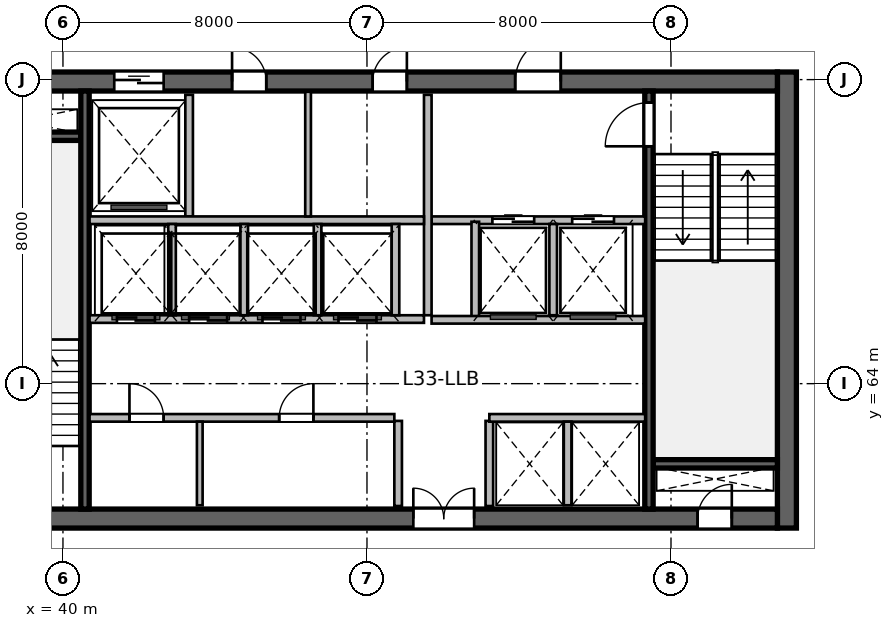
"""IFC4 building model, lengths in metres.
Left out: names, types, materials, properties, quantities, classifications, styles, units other than length and angle.
Written with IfcOpenShell. Run it as: python <this file> out.ifc"""

import sys

from ifc_helpers import new_model, si_unit, direction, frame, frame_2d, origin, place, context, subcontext, project, spatial, rectangle, extrude, source, transform, mapped, element, fill, save


model = new_model("IFC4")
c1 = context("Model", 3, precision=1e-05, world=origin(), true_north=direction((0.0, 1.0)))
c2 = subcontext(c1, "Body", "Model", "MODEL_VIEW")
j1 = project(units=[si_unit("LENGTHUNIT", "METRE"), si_unit("PLANEANGLEUNIT", "RADIAN")], contexts=[c1])
p1 = place(None, origin())
s1 = spatial("IfcSite", under=j1, at=p1, CompositionType="ELEMENT")
p2 = place(p1, origin())
s2 = spatial("IfcBuilding", under=s1, at=p2, CompositionType="ELEMENT")
p3 = place(p2, frame((0.0, 0.0, 138.9)))
s3 = spatial("IfcBuildingStorey", under=s2, at=p3, CompositionType="ELEMENT", Elevation=138.9)
m1 = source(origin(), c2, "Body", "SweptSolid", [
    extrude(rectangle(XDim=12.0, YDim=0.5, at=frame_2d((6.0, 0.0))), origin(), (0.0, 0.0, 1.0), 3.9),
])
p4 = place(p3, frame((59.05, 60.2, 0.0), z_axis=(0.0, 0.0, 1.0), x_axis=(0.0, 1.0, 0.0)))
e1 = element("IfcWall", 1, at=p4, inside=s3, PredefinedType="SHEAR", context=c2, shape_type="MappedRepresentation", body=[
    mapped(m1, transform((0.0, 0.0, 0.0), scale=1.0)),
])
m2 = source(origin(), c2, "Body", "SweptSolid", [
    extrude(rectangle(XDim=21.6, YDim=0.5, at=frame_2d((10.8, 0.0))), origin(), (0.0, 0.0, 1.0), 3.9),
])
p5 = place(p3, frame((37.2, 60.45, 0.0), z_axis=(0.0, 0.0, 1.0), x_axis=(1.0, 0.0, 0.0)))
e2 = element("IfcWall", 2, at=p5, inside=s3, PredefinedType="SHEAR", context=c2, shape_type="MappedRepresentation", body=[
    mapped(m2, transform((0.0, 0.0, 0.0), scale=1.0)),
])
p6 = place(p5, frame((1.1, 0.0, 0.0)))
e3 = element("IfcOpeningElement", 3, at=p6, cuts=e2, PredefinedType="OPENING", context=c2, shape_type="SweptSolid", body=[
    extrude(rectangle(XDim=1.15, YDim=2.15, at=frame_2d((0.575, 1.075))), frame((0.0, 0.26, 0.0), z_axis=(0.0, -1.0, 0.0), x_axis=(1.0, 0.0, 0.0)), (0.0, 0.0, 1.0), 0.52),
])
p7 = place(p5, frame((19.5, 0.0, 0.0)))
e4 = element("IfcOpeningElement", 4, at=p7, cuts=e2, PredefinedType="OPENING", context=c2, shape_type="SweptSolid", body=[
    extrude(rectangle(XDim=0.9, YDim=2.1, at=frame_2d((0.45, 1.05))), frame((0.0, 0.26, 0.0), z_axis=(0.0, -1.0, 0.0), x_axis=(1.0, 0.0, 0.0)), (0.0, 0.0, 1.0), 0.52),
])
p8 = place(p5, frame((12.02, 0.0, 0.0)))
e5 = element("IfcOpeningElement", 5, at=p8, cuts=e2, PredefinedType="OPENING", context=c2, shape_type="SweptSolid", body=[
    extrude(rectangle(XDim=1.6, YDim=2.15, at=frame_2d((0.8, 1.075))), frame((0.0, 0.26, 0.0), z_axis=(0.0, -1.0, 0.0), x_axis=(1.0, 0.0, 0.0)), (0.0, 0.0, 1.0), 0.52),
])
p9 = place(p3, frame((37.2, 71.95, 0.0), z_axis=(0.0, 0.0, 1.0), x_axis=(1.0, 0.0, 0.0)))
e6 = element("IfcWall", 6, at=p9, inside=s3, PredefinedType="SHEAR", context=c2, shape_type="MappedRepresentation", body=[
    mapped(m2, transform((0.0, 0.0, 0.0), scale=1.0)),
])
p10 = place(p9, frame((1.2, 0.0, 0.0)))
e7 = element("IfcOpeningElement", 7, at=p10, cuts=e6, PredefinedType="OPENING", context=c2, shape_type="SweptSolid", body=[
    extrude(rectangle(XDim=0.9, YDim=2.1, at=frame_2d((0.45, 1.05))), frame((0.0, 0.26, 0.0), z_axis=(0.0, -1.0, 0.0), x_axis=(1.0, 0.0, 0.0)), (0.0, 0.0, 1.0), 0.52),
])
p11 = place(p9, frame((14.7, 0.0, 0.0)))
e8 = element("IfcOpeningElement", 8, at=p11, cuts=e6, PredefinedType="OPENING", context=c2, shape_type="SweptSolid", body=[
    extrude(rectangle(XDim=1.2, YDim=2.15, at=frame_2d((0.6, 1.075))), frame((0.0, 0.26, 0.0), z_axis=(0.0, -1.0, 0.0), x_axis=(1.0, 0.0, 0.0)), (0.0, 0.0, 1.0), 0.52),
])
p12 = place(p9, frame((4.15, 0.0, 0.0)))
e9 = element("IfcOpeningElement", 9, at=p12, cuts=e6, PredefinedType="OPENING", context=c2, shape_type="SweptSolid", body=[
    extrude(rectangle(XDim=1.3, YDim=2.15, at=frame_2d((0.65, 1.075))), frame((0.0, 0.26, 0.0), z_axis=(0.0, -1.0, 0.0), x_axis=(1.0, 0.0, 0.0)), (0.0, 0.0, 1.0), 0.52),
])
p13 = place(p9, frame((7.25, 0.0, 0.0)))
e10 = element("IfcOpeningElement", 10, at=p13, cuts=e6, PredefinedType="OPENING", context=c2, shape_type="SweptSolid", body=[
    extrude(rectangle(XDim=0.9, YDim=2.1, at=frame_2d((0.45, 1.05))), frame((0.0, 0.26, 0.0), z_axis=(0.0, -1.0, 0.0), x_axis=(1.0, 0.0, 0.0)), (0.0, 0.0, 1.0), 0.52),
])
p14 = place(p9, frame((10.95, 0.0, 0.0)))
e11 = element("IfcOpeningElement", 11, at=p14, cuts=e6, PredefinedType="OPENING", context=c2, shape_type="SweptSolid", body=[
    extrude(rectangle(XDim=0.9, YDim=2.1, at=frame_2d((0.45, 1.05))), frame((0.0, 0.26, 0.0), z_axis=(0.0, -1.0, 0.0), x_axis=(1.0, 0.0, 0.0)), (0.0, 0.0, 1.0), 0.52),
])
m3 = source(origin(), c2, "Body", "SweptSolid", [
    extrude(rectangle(XDim=3.27, YDim=0.22, at=frame_2d((1.635, 0.0))), origin(), (0.0, 0.0, 1.0), 3.9),
])
for number, where, z_axis, x_axis in (
    (12, (37.2, 70.51, 0.0), (0.0, 0.0, 1.0), (1.0, 0.0, 0.0)),
    (13, (55.53, 61.89, 0.0), (0.0, 0.0, 1.0), (1.0, 0.0, 0.0)),
):
    element("IfcWall", number, at=place(p3, frame(where, z_axis=z_axis, x_axis=x_axis)), inside=s3, PredefinedType="SHEAR", context=c2, shape_type="MappedRepresentation", body=[
        mapped(m3, transform((0.0, 0.0, 0.0), scale=1.0)),
    ])
m4 = source(origin(), c2, "Body", "SweptSolid", [
    extrude(rectangle(XDim=11.0, YDim=0.22, at=frame_2d((5.5, 0.0))), origin(), (0.0, 0.0, 1.0), 3.9),
])
p15 = place(p3, frame((40.58, 60.7, 0.0), z_axis=(0.0, 0.0, 1.0), x_axis=(0.0, 1.0, 0.0)))
e14 = element("IfcWall", 14, at=p15, inside=s3, PredefinedType="SHEAR", context=c2, shape_type="MappedRepresentation", body=[
    mapped(m4, transform((0.0, 0.0, 0.0), scale=1.0)),
])
p16 = place(p3, frame((55.42, 60.7, 0.0), z_axis=(0.0, 0.0, 1.0), x_axis=(0.0, 1.0, 0.0)))
e15 = element("IfcWall", 15, at=p16, inside=s3, PredefinedType="SHEAR", context=c2, shape_type="MappedRepresentation", body=[
    mapped(m4, transform((0.0, 0.0, 0.0), scale=1.0)),
])
p17 = place(p16, frame((9.545, 0.0, 0.0)))
e16 = element("IfcOpeningElement", 16, at=p17, cuts=e15, PredefinedType="OPENING", context=c2, shape_type="SweptSolid", body=[
    extrude(rectangle(XDim=1.15, YDim=2.15, at=frame_2d((0.575, 1.075))), frame((0.0, 0.12, 0.0), z_axis=(0.0, -1.0, 0.0), x_axis=(1.0, 0.0, 0.0)), (0.0, 0.0, 1.0), 0.24),
])
m5 = source(origin(), c2, "Body", "SweptSolid", [
    extrude(rectangle(XDim=2.24, YDim=0.2, at=frame_2d((1.12, 0.0))), origin(), (0.0, 0.0, 1.0), 3.65),
])
for number, where, z_axis, x_axis in (
    (17, (48.82, 60.78, 0.0), (0.0, 0.0, 1.0), (0.0, 1.0, 0.0)),
    (18, (51.22, 60.78, 0.0), (0.0, 0.0, 1.0), (0.0, 1.0, 0.0)),
):
    element("IfcWall", number, at=place(p3, frame(where, z_axis=z_axis, x_axis=x_axis)), inside=s3, PredefinedType="SOLIDWALL", context=c2, shape_type="MappedRepresentation", body=[
        mapped(m5, transform((0.0, 0.0, 0.0), scale=1.0)),
    ])
m6 = source(origin(), c2, "Body", "SweptSolid", [
    extrude(rectangle(XDim=5.62, YDim=0.2, at=frame_2d((2.81, 0.0))), origin(), (0.0, 0.0, 1.0), 3.65),
])
p18 = place(p3, frame((49.7, 68.3, 0.0), z_axis=(0.0, 0.0, 1.0), x_axis=(1.0, 0.0, 0.0)))
e19 = element("IfcWall", 19, at=p18, inside=s3, PredefinedType="SOLIDWALL", context=c2, shape_type="MappedRepresentation", body=[
    mapped(m6, transform((0.0, 0.0, 0.0), scale=1.0)),
])
p19 = place(p18, frame((1.6, 0.0, 0.0)))
e20 = element("IfcOpeningElement", 20, at=p19, cuts=e19, PredefinedType="OPENING", context=c2, shape_type="SweptSolid", body=[
    extrude(rectangle(XDim=1.1, YDim=2.15, at=frame_2d((0.55, 1.075))), frame((0.0, 0.11, 0.0), z_axis=(0.0, -1.0, 0.0), x_axis=(1.0, 0.0, 0.0)), (0.0, 0.0, 1.0), 0.22),
])
p20 = place(p18, frame((3.7, 0.0, 0.0)))
e21 = element("IfcOpeningElement", 21, at=p20, cuts=e19, PredefinedType="OPENING", context=c2, shape_type="SweptSolid", body=[
    extrude(rectangle(XDim=1.1, YDim=2.15, at=frame_2d((0.55, 1.075))), frame((0.0, 0.11, 0.0), z_axis=(0.0, -1.0, 0.0), x_axis=(1.0, 0.0, 0.0)), (0.0, 0.0, 1.0), 0.22),
])
m7 = source(origin(), c2, "Body", "SweptSolid", [
    extrude(rectangle(XDim=5.8, YDim=0.2, at=frame_2d((2.9, 0.0))), origin(), (0.0, 0.0, 1.0), 3.65),
])
p21 = place(p3, frame((49.6, 65.8, 0.0), z_axis=(0.0, 0.0, 1.0), x_axis=(0.0, 1.0, 0.0)))
e22 = element("IfcWall", 22, at=p21, inside=s3, PredefinedType="SOLIDWALL", context=c2, shape_type="MappedRepresentation", body=[
    mapped(m7, transform((0.0, 0.0, 0.0), scale=1.0)),
])
m8 = source(origin(), c2, "Body", "SweptSolid", [
    extrude(rectangle(XDim=2.58, YDim=0.2, at=frame_2d((1.29, 0.0))), origin(), (0.0, 0.0, 1.0), 3.65),
])
p22 = place(p3, frame((50.85, 65.68, 0.0), z_axis=(0.0, 0.0, 1.0), x_axis=(0.0, 1.0, 0.0)))
e23 = element("IfcWall", 23, at=p22, inside=s3, PredefinedType="SOLIDWALL", context=c2, shape_type="MappedRepresentation", body=[
    mapped(m8, transform((0.0, 0.0, 0.0), scale=1.0)),
])
m9 = source(origin(), c2, "Body", "SweptSolid", [
    extrude(rectangle(XDim=2.4, YDim=0.2, at=frame_2d((1.2, 0.0))), origin(), (0.0, 0.0, 1.0), 3.65),
])
p23 = place(p3, frame((52.9, 65.8, 0.0), z_axis=(0.0, 0.0, 1.0), x_axis=(0.0, 1.0, 0.0)))
e24 = element("IfcWall", 24, at=p23, inside=s3, PredefinedType="SOLIDWALL", context=c2, shape_type="MappedRepresentation", body=[
    mapped(m9, transform((0.0, 0.0, 0.0), scale=1.0)),
])
p24 = place(p3, frame((49.7, 65.68, 0.0), z_axis=(0.0, 0.0, 1.0), x_axis=(1.0, 0.0, 0.0)))
e25 = element("IfcWall", 25, at=p24, inside=s3, PredefinedType="SOLIDWALL", context=c2, shape_type="MappedRepresentation", body=[
    mapped(m6, transform((0.0, 0.0, 0.0), scale=1.0)),
])
m10 = source(origin(), c2, "Body", "SweptSolid", [
    extrude(rectangle(XDim=3.2, YDim=0.2, at=frame_2d((1.6, 0.0))), origin(), (0.0, 0.0, 1.0), 3.65),
])
p25 = place(p3, frame((43.32, 68.4, 0.0), z_axis=(0.0, 0.0, 1.0), x_axis=(0.0, 1.0, 0.0)))
e26 = element("IfcWall", 26, at=p25, inside=s3, PredefinedType="SOLIDWALL", context=c2, shape_type="MappedRepresentation", body=[
    mapped(m10, transform((0.0, 0.0, 0.0), scale=1.0)),
])
m11 = source(origin(), c2, "Body", "SweptSolid", [
    extrude(rectangle(XDim=8.8, YDim=0.2, at=frame_2d((4.4, 0.0))), origin(), (0.0, 0.0, 1.0), 3.65),
])
p26 = place(p3, frame((40.7, 68.3, 0.0), z_axis=(0.0, 0.0, 1.0), x_axis=(1.0, 0.0, 0.0)))
e27 = element("IfcWall", 27, at=p26, inside=s3, PredefinedType="SOLIDWALL", context=c2, shape_type="MappedRepresentation", body=[
    mapped(m11, transform((0.0, 0.0, 0.0), scale=1.0)),
])
m12 = source(origin(), c2, "Body", "SweptSolid", [
    extrude(rectangle(XDim=3.28, YDim=0.15, at=frame_2d((1.64, 0.0))), origin(), (0.0, 0.0, 1.0), 3.65),
])
p27 = place(p3, frame((46.45, 68.4, 0.0), z_axis=(0.0, 0.0, 1.0), x_axis=(0.0, 1.0, 0.0)))
e28 = element("IfcWall", 28, at=p27, inside=s3, PredefinedType="PARTITIONING", context=c2, shape_type="MappedRepresentation", body=[
    mapped(m12, transform((0.0, 0.0, 0.0), scale=1.0)),
])
m13 = source(origin(), c2, "Body", "SweptSolid", [
    extrude(rectangle(XDim=8.02, YDim=0.2, at=frame_2d((4.01, 0.0))), origin(), (0.0, 0.0, 1.0), 3.65),
])
p28 = place(p3, frame((40.7, 63.1, 0.0), z_axis=(0.0, 0.0, 1.0), x_axis=(1.0, 0.0, 0.0)))
e29 = element("IfcWall", 29, at=p28, inside=s3, PredefinedType="SOLIDWALL", context=c2, shape_type="MappedRepresentation", body=[
    mapped(m13, transform((0.0, 0.0, 0.0), scale=1.0)),
])
p29 = place(p28, frame((1.05, 0.0, 0.0)))
e30 = element("IfcOpeningElement", 30, at=p29, cuts=e29, PredefinedType="OPENING", context=c2, shape_type="SweptSolid", body=[
    extrude(rectangle(XDim=0.9, YDim=2.1, at=frame_2d((0.45, 1.05))), frame((0.0, 0.11, 0.0), z_axis=(0.0, -1.0, 0.0), x_axis=(1.0, 0.0, 0.0)), (0.0, 0.0, 1.0), 0.22),
])
p30 = place(p28, frame((4.99, 0.0, 0.0)))
e31 = element("IfcOpeningElement", 31, at=p30, cuts=e29, PredefinedType="OPENING", context=c2, shape_type="SweptSolid", body=[
    extrude(rectangle(XDim=0.9, YDim=2.1, at=frame_2d((0.45, 1.05))), frame((0.0, 0.11, 0.0), z_axis=(0.0, -1.0, 0.0), x_axis=(1.0, 0.0, 0.0)), (0.0, 0.0, 1.0), 0.22),
])
m14 = source(origin(), c2, "Body", "SweptSolid", [
    extrude(rectangle(XDim=4.1, YDim=0.2, at=frame_2d((2.05, 0.0))), origin(), (0.0, 0.0, 1.0), 3.65),
])
p31 = place(p3, frame((51.22, 63.1, 0.0), z_axis=(0.0, 0.0, 1.0), x_axis=(1.0, 0.0, 0.0)))
e32 = element("IfcWall", 32, at=p31, inside=s3, PredefinedType="SOLIDWALL", context=c2, shape_type="MappedRepresentation", body=[
    mapped(m14, transform((0.0, 0.0, 0.0), scale=1.0)),
])
m15 = source(origin(), c2, "Body", "SweptSolid", [
    extrude(rectangle(XDim=2.2, YDim=0.15, at=frame_2d((1.1, 0.0))), origin(), (0.0, 0.0, 1.0), 3.65),
])
p32 = place(p3, frame((43.6, 60.8, 0.0), z_axis=(0.0, 0.0, 1.0), x_axis=(0.0, 1.0, 0.0)))
e33 = element("IfcWall", 33, at=p32, inside=s3, PredefinedType="PARTITIONING", context=c2, shape_type="MappedRepresentation", body=[
    mapped(m15, transform((0.0, 0.0, 0.0), scale=1.0)),
])
m16 = source(origin(), c2, "Body", "SweptSolid", [
    extrude(rectangle(XDim=2.2, YDim=0.2, at=frame_2d((1.1, 0.0))), origin(), (0.0, 0.0, 1.0), 3.65),
])
p33 = place(p3, frame((53.28, 60.8, 0.0), z_axis=(0.0, 0.0, 1.0), x_axis=(0.0, 1.0, 0.0)))
e34 = element("IfcWall", 34, at=p33, inside=s3, PredefinedType="SOLIDWALL", context=c2, shape_type="MappedRepresentation", body=[
    mapped(m16, transform((0.0, 0.0, 0.0), scale=1.0)),
])
p34 = place(p3, frame((40.7, 65.7, 0.0), z_axis=(0.0, 0.0, 1.0), x_axis=(1.0, 0.0, 0.0)))
e35 = element("IfcWall", 35, at=p34, inside=s3, PredefinedType="SOLIDWALL", context=c2, shape_type="MappedRepresentation", body=[
    mapped(m11, transform((0.0, 0.0, 0.0), scale=1.0)),
])
p35 = place(p34, frame((0.72, 0.0, 0.0)))
e36 = element("IfcOpeningElement", 36, at=p35, cuts=e35, PredefinedType="OPENING", context=c2, shape_type="SweptSolid", body=[
    extrude(rectangle(XDim=1.0, YDim=2.15, at=frame_2d((0.5, 1.075))), frame((0.0, 0.11, 0.0), z_axis=(0.0, -1.0, 0.0), x_axis=(1.0, 0.0, 0.0)), (0.0, 0.0, 1.0), 0.22),
])
p36 = place(p34, frame((2.62, 0.0, 0.0)))
e37 = element("IfcOpeningElement", 37, at=p36, cuts=e35, PredefinedType="OPENING", context=c2, shape_type="SweptSolid", body=[
    extrude(rectangle(XDim=1.0, YDim=2.15, at=frame_2d((0.5, 1.075))), frame((0.0, 0.11, 0.0), z_axis=(0.0, -1.0, 0.0), x_axis=(1.0, 0.0, 0.0)), (0.0, 0.0, 1.0), 0.22),
])
p37 = place(p34, frame((4.55, 0.0, 0.0)))
e38 = element("IfcOpeningElement", 38, at=p37, cuts=e35, PredefinedType="OPENING", context=c2, shape_type="SweptSolid", body=[
    extrude(rectangle(XDim=1.0, YDim=2.15, at=frame_2d((0.5, 1.075))), frame((0.0, 0.11, 0.0), z_axis=(0.0, -1.0, 0.0), x_axis=(1.0, 0.0, 0.0)), (0.0, 0.0, 1.0), 0.22),
])
p38 = place(p34, frame((6.55, 0.0, 0.0)))
e39 = element("IfcOpeningElement", 39, at=p38, cuts=e35, PredefinedType="OPENING", context=c2, shape_type="SweptSolid", body=[
    extrude(rectangle(XDim=1.0, YDim=2.15, at=frame_2d((0.5, 1.075))), frame((0.0, 0.11, 0.0), z_axis=(0.0, -1.0, 0.0), x_axis=(1.0, 0.0, 0.0)), (0.0, 0.0, 1.0), 0.22),
])
for number, where, z_axis, x_axis in (
    (40, (48.75, 65.8, 0.0), (0.0, 0.0, 1.0), (0.0, 1.0, 0.0)),
    (41, (42.87, 65.8, 0.0), (0.0, 0.0, 1.0), (0.0, 1.0, 0.0)),
    (42, (44.77, 65.8, 0.0), (0.0, 0.0, 1.0), (0.0, 1.0, 0.0)),
    (43, (46.7, 65.8, 0.0), (0.0, 0.0, 1.0), (0.0, 1.0, 0.0)),
):
    element("IfcWall", number, at=place(p3, frame(where, z_axis=z_axis, x_axis=x_axis)), inside=s3, PredefinedType="SOLIDWALL", context=c2, shape_type="MappedRepresentation", body=[
        mapped(m9, transform((0.0, 0.0, 0.0), scale=1.0)),
    ])
m17 = source(origin(), c2, "Body", "SweptSolid", [
    extrude(rectangle(XDim=0.9, YDim=2.1, at=frame_2d((0.45, 1.05))), frame((0.0, 0.025, 0.0), z_axis=(0.0, -1.0, 0.0), x_axis=(1.0, 0.0, 0.0)), (0.0, 0.0, 1.0), 0.05),
])
p39 = place(p7, origin())
e44 = element("IfcDoor", 44, at=p39, inside=s3, OperationType="SINGLE_SWING_RIGHT", PredefinedType="DOOR", context=c2, shape_type="MappedRepresentation", body=[
    mapped(m17, transform((0.0, 0.0, 0.0), scale=1.0)),
])
fill(e4, e44)
m18 = source(origin(), c2, "Body", "SweptSolid", [
    extrude(rectangle(XDim=1.15, YDim=2.15, at=frame_2d((0.575, 1.075))), frame((0.0, 0.025, 0.0), z_axis=(0.0, -1.0, 0.0), x_axis=(1.0, 0.0, 0.0)), (0.0, 0.0, 1.0), 0.05),
])
p40 = place(p17, origin())
e45 = element("IfcDoor", 45, at=p40, inside=s3, OperationType="SINGLE_SWING_LEFT", PredefinedType="DOOR", context=c2, shape_type="MappedRepresentation", body=[
    mapped(m18, transform((0.0, 0.0, 0.0), scale=1.0)),
])
fill(e16, e45)
m19 = source(origin(), c2, "Body", "SweptSolid", [
    extrude(rectangle(XDim=1.6, YDim=2.15, at=frame_2d((0.8, 1.075))), frame((0.0, 0.025, 0.0), z_axis=(0.0, -1.0, 0.0), x_axis=(1.0, 0.0, 0.0)), (0.0, 0.0, 1.0), 0.05),
])
p41 = place(p8, origin())
e46 = element("IfcDoor", 46, at=p41, inside=s3, OperationType="DOUBLE_DOOR_SINGLE_SWING", PredefinedType="DOOR", context=c2, shape_type="MappedRepresentation", body=[
    mapped(m19, transform((0.0, 0.0, 0.0), scale=1.0)),
])
fill(e5, e46)
m20 = source(origin(), c2, "Body", "SweptSolid", [
    extrude(rectangle(XDim=1.2, YDim=2.15, at=frame_2d((0.6, 1.075))), frame((0.0, 0.025, 0.0), z_axis=(0.0, -1.0, 0.0), x_axis=(1.0, 0.0, 0.0)), (0.0, 0.0, 1.0), 0.05),
])
p42 = place(p11, origin())
e47 = element("IfcDoor", 47, at=p42, inside=s3, OperationType="SINGLE_SWING_RIGHT", PredefinedType="DOOR", context=c2, shape_type="MappedRepresentation", body=[
    mapped(m20, transform((0.0, 0.0, 0.0), scale=1.0)),
])
fill(e8, e47)
m21 = source(origin(), c2, "Body", "SweptSolid", [
    extrude(rectangle(XDim=1.1, YDim=2.15, at=frame_2d((0.55, 1.075))), frame((0.0, 0.025, 0.0), z_axis=(0.0, -1.0, 0.0), x_axis=(1.0, 0.0, 0.0)), (0.0, 0.0, 1.0), 0.05),
])
p43 = place(p19, origin())
e48 = element("IfcDoor", 48, at=p43, inside=s3, OperationType="DOUBLE_DOOR_SLIDING", PredefinedType="DOOR", context=c2, shape_type="MappedRepresentation", body=[
    mapped(m21, transform((0.0, 0.0, 0.0), scale=1.0)),
])
fill(e20, e48)
p44 = place(p20, origin())
e49 = element("IfcDoor", 49, at=p44, inside=s3, OperationType="DOUBLE_DOOR_SLIDING", PredefinedType="DOOR", context=c2, shape_type="MappedRepresentation", body=[
    mapped(m21, transform((0.0, 0.0, 0.0), scale=1.0)),
])
fill(e21, e49)
m22 = source(origin(), c2, "Body", "SweptSolid", [
    extrude(rectangle(XDim=1.3, YDim=2.15, at=frame_2d((0.65, 1.075))), frame((0.0, 0.025, 0.0), z_axis=(0.0, -1.0, 0.0), x_axis=(1.0, 0.0, 0.0)), (0.0, 0.0, 1.0), 0.05),
])
p45 = place(p12, origin())
e50 = element("IfcDoor", 50, at=p45, inside=s3, OperationType="DOUBLE_DOOR_SLIDING", PredefinedType="DOOR", context=c2, shape_type="MappedRepresentation", body=[
    mapped(m22, transform((0.0, 0.0, 0.0), scale=1.0)),
])
fill(e9, e50)
p46 = place(p13, origin())
e51 = element("IfcDoor", 51, at=p46, inside=s3, OperationType="SINGLE_SWING_LEFT", PredefinedType="DOOR", context=c2, shape_type="MappedRepresentation", body=[
    mapped(m17, transform((0.0, 0.0, 0.0), scale=1.0)),
])
fill(e10, e51)
p47 = place(p14, origin())
e52 = element("IfcDoor", 52, at=p47, inside=s3, OperationType="SINGLE_SWING_RIGHT", PredefinedType="DOOR", context=c2, shape_type="MappedRepresentation", body=[
    mapped(m17, transform((0.0, 0.0, 0.0), scale=1.0)),
])
fill(e11, e52)
p48 = place(p29, origin())
e53 = element("IfcDoor", 53, at=p48, inside=s3, OperationType="SINGLE_SWING_LEFT", PredefinedType="DOOR", context=c2, shape_type="MappedRepresentation", body=[
    mapped(m17, transform((0.0, 0.0, 0.0), scale=1.0)),
])
fill(e30, e53)
p49 = place(p30, origin())
e54 = element("IfcDoor", 54, at=p49, inside=s3, OperationType="SINGLE_SWING_RIGHT", PredefinedType="DOOR", context=c2, shape_type="MappedRepresentation", body=[
    mapped(m17, transform((0.0, 0.0, 0.0), scale=1.0)),
])
fill(e31, e54)
m23 = source(origin(), c2, "Body", "SweptSolid", [
    extrude(rectangle(XDim=1.0, YDim=2.15, at=frame_2d((0.5, 1.075))), frame((0.0, 0.025, 0.0), z_axis=(0.0, -1.0, 0.0), x_axis=(1.0, 0.0, 0.0)), (0.0, 0.0, 1.0), 0.05),
])
p50 = place(p35, origin())
e55 = element("IfcDoor", 55, at=p50, inside=s3, OperationType="DOUBLE_DOOR_SLIDING", PredefinedType="DOOR", context=c2, shape_type="MappedRepresentation", body=[
    mapped(m23, transform((0.0, 0.0, 0.0), scale=1.0)),
])
fill(e36, e55)
p51 = place(p36, origin())
e56 = element("IfcDoor", 56, at=p51, inside=s3, OperationType="DOUBLE_DOOR_SLIDING", PredefinedType="DOOR", context=c2, shape_type="MappedRepresentation", body=[
    mapped(m23, transform((0.0, 0.0, 0.0), scale=1.0)),
])
fill(e37, e56)
p52 = place(p37, origin())
e57 = element("IfcDoor", 57, at=p52, inside=s3, OperationType="DOUBLE_DOOR_SLIDING", PredefinedType="DOOR", context=c2, shape_type="MappedRepresentation", body=[
    mapped(m23, transform((0.0, 0.0, 0.0), scale=1.0)),
])
fill(e38, e57)
p53 = place(p38, origin())
e58 = element("IfcDoor", 58, at=p53, inside=s3, OperationType="DOUBLE_DOOR_SLIDING", PredefinedType="DOOR", context=c2, shape_type="MappedRepresentation", body=[
    mapped(m23, transform((0.0, 0.0, 0.0), scale=1.0)),
])
fill(e39, e58)
save(model, sys.argv[1])
